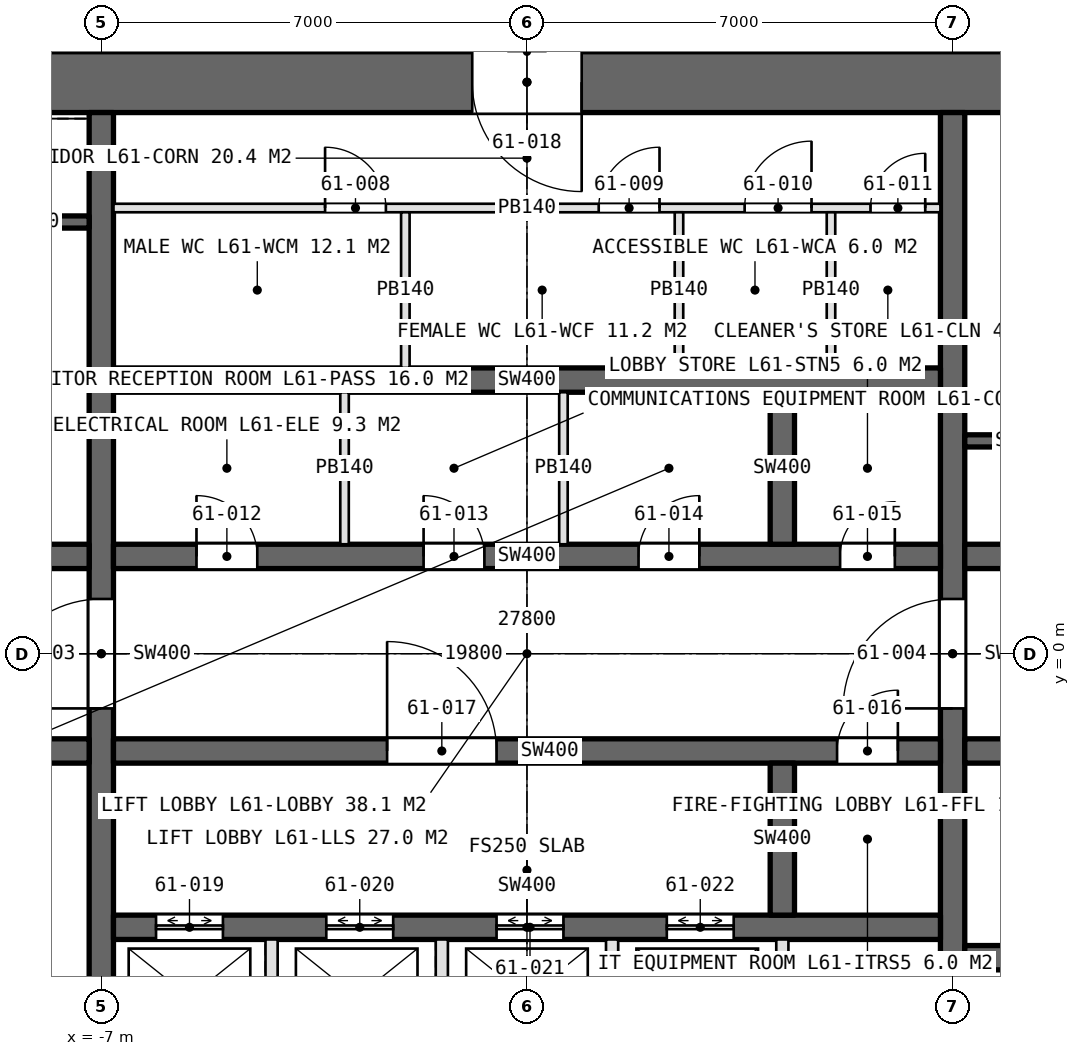
"""IFC4 building model, lengths in metres.
Left out: names, types, materials, properties, quantities, classifications, styles, units other than length and angle.
Written with IfcOpenShell. Run it as: python <this file> out.ifc"""

import sys

from ifc_helpers import new_model, si_unit, direction, frame, frame_2d, origin, place, context, subcontext, project, spatial, rectangle, extrude, element, fill, save


model = new_model("IFC4")
c1 = context("Model", 3, precision=1e-05, world=origin(), true_north=direction((0.0, 1.0)))
c2 = subcontext(c1, "Body", "Model", "MODEL_VIEW")
j1 = project(units=[si_unit("LENGTHUNIT", "METRE"), si_unit("PLANEANGLEUNIT", "RADIAN")], contexts=[c1])
p1 = place(None, origin())
s1 = spatial("IfcSite", under=j1, at=p1, CompositionType="ELEMENT")
p2 = place(p1, origin())
s2 = spatial("IfcBuilding", under=s1, at=p2, CompositionType="ELEMENT")
p3 = place(p2, frame((0.0, 0.0, 275.4)))
s3 = spatial("IfcBuildingStorey", under=s2, at=p3, CompositionType="ELEMENT", Elevation=275.4)
p4 = place(p3, frame((13.9, 9.4, 0.0), z_axis=(0.0, 0.0, 1.0), x_axis=(-1.0, 0.0, 0.0)))
e1 = element("IfcWall", 1, at=p4, inside=s3, PredefinedType="SHEAR", context=c2, shape_type="SweptSolid", body=[
    extrude(rectangle(XDim=27.8, YDim=1.0, at=frame_2d((13.9, 0.0))), origin(), (0.0, 0.0, 1.0), 4.2),
])
p5 = place(p4, frame((23.9, 0.0, 0.0)))
e2 = element("IfcOpeningElement", 2, at=p5, cuts=e1, PredefinedType="OPENING", context=c2, shape_type="SweptSolid", body=[
    extrude(rectangle(XDim=1.0, YDim=2.4, at=frame_2d((0.5, 1.2))), frame((0.0, 0.51, 0.0), z_axis=(0.0, -1.0, 0.0), x_axis=(1.0, 0.0, 0.0)), (0.0, 0.0, 1.0), 1.02),
])
p6 = place(p4, frame((13.0, 0.0, 0.0)))
e3 = element("IfcOpeningElement", 3, at=p6, cuts=e1, PredefinedType="OPENING", context=c2, shape_type="SweptSolid", body=[
    extrude(rectangle(XDim=1.8, YDim=2.4, at=frame_2d((0.9, 1.2))), frame((0.0, 0.51, 0.0), z_axis=(0.0, -1.0, 0.0), x_axis=(1.0, 0.0, 0.0)), (0.0, 0.0, 1.0), 1.02),
])
p7 = place(p3, frame((-7.0, -8.9, 0.0), z_axis=(0.0, 0.0, 1.0), x_axis=(0.0, 1.0, 0.0)))
e4 = element("IfcWall", 4, at=p7, inside=s3, PredefinedType="SHEAR", context=c2, shape_type="SweptSolid", body=[
    extrude(rectangle(XDim=17.8, YDim=0.4, at=frame_2d((8.9, 0.0))), origin(), (0.0, 0.0, 1.0), 4.2),
])
p8 = place(p7, frame((8.0, 0.0, 0.0)))
e5 = element("IfcOpeningElement", 5, at=p8, cuts=e4, PredefinedType="OPENING", context=c2, shape_type="SweptSolid", body=[
    extrude(rectangle(XDim=1.8, YDim=2.4, at=frame_2d((0.9, 1.2))), frame((0.0, 0.21, 0.0), z_axis=(0.0, -1.0, 0.0), x_axis=(1.0, 0.0, 0.0)), (0.0, 0.0, 1.0), 0.42),
])
p9 = place(p3, frame((7.0, -8.9, 0.0), z_axis=(0.0, 0.0, 1.0), x_axis=(0.0, 1.0, 0.0)))
e6 = element("IfcWall", 6, at=p9, inside=s3, PredefinedType="SHEAR", context=c2, shape_type="SweptSolid", body=[
    extrude(rectangle(XDim=17.8, YDim=0.4, at=frame_2d((8.9, 0.0))), origin(), (0.0, 0.0, 1.0), 4.2),
])
p10 = place(p9, frame((8.0, 0.0, 0.0)))
e7 = element("IfcOpeningElement", 7, at=p10, cuts=e6, PredefinedType="OPENING", context=c2, shape_type="SweptSolid", body=[
    extrude(rectangle(XDim=1.8, YDim=2.4, at=frame_2d((0.9, 1.2))), frame((0.0, 0.21, 0.0), z_axis=(0.0, -1.0, 0.0), x_axis=(1.0, 0.0, 0.0)), (0.0, 0.0, 1.0), 0.42),
])
p11 = place(p3, frame((-6.8, 1.6, 0.0), z_axis=(0.0, 0.0, 1.0), x_axis=(1.0, 0.0, 0.0)))
e8 = element("IfcWall", 8, at=p11, inside=s3, PredefinedType="SHEAR", context=c2, shape_type="SweptSolid", body=[
    extrude(rectangle(XDim=13.6, YDim=0.4, at=frame_2d((6.8, 0.0))), origin(), (0.0, 0.0, 1.0), 4.2),
])
p12 = place(p11, frame((1.365, 0.0, 0.0)))
e9 = element("IfcOpeningElement", 9, at=p12, cuts=e8, PredefinedType="OPENING", context=c2, shape_type="SweptSolid", body=[
    extrude(rectangle(XDim=1.0, YDim=2.4, at=frame_2d((0.5, 1.2))), frame((0.0, 0.21, 0.0), z_axis=(0.0, -1.0, 0.0), x_axis=(1.0, 0.0, 0.0)), (0.0, 0.0, 1.0), 0.42),
])
p13 = place(p11, frame((5.1, 0.0, 0.0)))
e10 = element("IfcOpeningElement", 10, at=p13, cuts=e8, PredefinedType="OPENING", context=c2, shape_type="SweptSolid", body=[
    extrude(rectangle(XDim=1.0, YDim=2.4, at=frame_2d((0.5, 1.2))), frame((0.0, 0.21, 0.0), z_axis=(0.0, -1.0, 0.0), x_axis=(1.0, 0.0, 0.0)), (0.0, 0.0, 1.0), 0.42),
])
p14 = place(p11, frame((8.635, 0.0, 0.0)))
e11 = element("IfcOpeningElement", 11, at=p14, cuts=e8, PredefinedType="OPENING", context=c2, shape_type="SweptSolid", body=[
    extrude(rectangle(XDim=1.0, YDim=2.4, at=frame_2d((0.5, 1.2))), frame((0.0, 0.21, 0.0), z_axis=(0.0, -1.0, 0.0), x_axis=(1.0, 0.0, 0.0)), (0.0, 0.0, 1.0), 0.42),
])
p15 = place(p11, frame((11.95, 0.0, 0.0)))
e12 = element("IfcOpeningElement", 12, at=p15, cuts=e8, PredefinedType="OPENING", context=c2, shape_type="SweptSolid", body=[
    extrude(rectangle(XDim=0.9, YDim=2.4, at=frame_2d((0.45, 1.2))), frame((0.0, 0.21, 0.0), z_axis=(0.0, -1.0, 0.0), x_axis=(1.0, 0.0, 0.0)), (0.0, 0.0, 1.0), 0.42),
])
p16 = place(p3, frame((-6.8, -1.6, 0.0), z_axis=(0.0, 0.0, 1.0), x_axis=(1.0, 0.0, 0.0)))
e13 = element("IfcWall", 13, at=p16, inside=s3, PredefinedType="SHEAR", context=c2, shape_type="SweptSolid", body=[
    extrude(rectangle(XDim=13.6, YDim=0.4, at=frame_2d((6.8, 0.0))), origin(), (0.0, 0.0, 1.0), 4.2),
])
p17 = place(p16, frame((11.9, 0.0, 0.0)))
e14 = element("IfcOpeningElement", 14, at=p17, cuts=e13, PredefinedType="OPENING", context=c2, shape_type="SweptSolid", body=[
    extrude(rectangle(XDim=1.0, YDim=2.4, at=frame_2d((0.5, 1.2))), frame((0.0, 0.21, 0.0), z_axis=(0.0, -1.0, 0.0), x_axis=(1.0, 0.0, 0.0)), (0.0, 0.0, 1.0), 0.42),
])
p18 = place(p16, frame((4.5, 0.0, 0.0)))
e15 = element("IfcOpeningElement", 15, at=p18, cuts=e13, PredefinedType="OPENING", context=c2, shape_type="SweptSolid", body=[
    extrude(rectangle(XDim=1.8, YDim=2.4, at=frame_2d((0.9, 1.2))), frame((0.0, 0.21, 0.0), z_axis=(0.0, -1.0, 0.0), x_axis=(1.0, 0.0, 0.0)), (0.0, 0.0, 1.0), 0.42),
])
p19 = place(p3, frame((-6.8, 4.5, 0.0), z_axis=(0.0, 0.0, 1.0), x_axis=(1.0, 0.0, 0.0)))
e16 = element("IfcWall", 16, at=p19, inside=s3, PredefinedType="SHEAR", context=c2, shape_type="SweptSolid", body=[
    extrude(rectangle(XDim=13.6, YDim=0.4, at=frame_2d((6.8, 0.0))), origin(), (0.0, 0.0, 1.0), 4.2),
])
p20 = place(p3, frame((-6.8, -4.5, 0.0), z_axis=(0.0, 0.0, 1.0), x_axis=(1.0, 0.0, 0.0)))
e17 = element("IfcWall", 17, at=p20, inside=s3, PredefinedType="SHEAR", context=c2, shape_type="SweptSolid", body=[
    extrude(rectangle(XDim=13.6, YDim=0.4, at=frame_2d((6.8, 0.0))), origin(), (0.0, 0.0, 1.0), 4.2),
])
p21 = place(p20, frame((0.7, 0.0, 0.0)))
e18 = element("IfcOpeningElement", 18, at=p21, cuts=e17, PredefinedType="OPENING", context=c2, shape_type="SweptSolid", body=[
    extrude(rectangle(XDim=1.1, YDim=2.4, at=frame_2d((0.55, 1.2))), frame((0.0, 0.21, 0.0), z_axis=(0.0, -1.0, 0.0), x_axis=(1.0, 0.0, 0.0)), (0.0, 0.0, 1.0), 0.42),
])
p22 = place(p20, frame((3.5, 0.0, 0.0)))
e19 = element("IfcOpeningElement", 19, at=p22, cuts=e17, PredefinedType="OPENING", context=c2, shape_type="SweptSolid", body=[
    extrude(rectangle(XDim=1.1, YDim=2.4, at=frame_2d((0.55, 1.2))), frame((0.0, 0.21, 0.0), z_axis=(0.0, -1.0, 0.0), x_axis=(1.0, 0.0, 0.0)), (0.0, 0.0, 1.0), 0.42),
])
p23 = place(p20, frame((6.3, 0.0, 0.0)))
e20 = element("IfcOpeningElement", 20, at=p23, cuts=e17, PredefinedType="OPENING", context=c2, shape_type="SweptSolid", body=[
    extrude(rectangle(XDim=1.1, YDim=2.4, at=frame_2d((0.55, 1.2))), frame((0.0, 0.21, 0.0), z_axis=(0.0, -1.0, 0.0), x_axis=(1.0, 0.0, 0.0)), (0.0, 0.0, 1.0), 0.42),
])
p24 = place(p20, frame((9.1, 0.0, 0.0)))
e21 = element("IfcOpeningElement", 21, at=p24, cuts=e17, PredefinedType="OPENING", context=c2, shape_type="SweptSolid", body=[
    extrude(rectangle(XDim=1.1, YDim=2.4, at=frame_2d((0.55, 1.2))), frame((0.0, 0.21, 0.0), z_axis=(0.0, -1.0, 0.0), x_axis=(1.0, 0.0, 0.0)), (0.0, 0.0, 1.0), 0.42),
])
for number, where, z_axis, x_axis in (
    (22, (-12.9, 1.6, 0.0), (0.0, 0.0, 1.0), (1.0, 0.0, 0.0)),
    (23, (-12.9, -1.6, 0.0), (0.0, 0.0, 1.0), (1.0, 0.0, 0.0)),
):
    element("IfcWall", number, at=place(p3, frame(where, z_axis=z_axis, x_axis=x_axis)), inside=s3, PredefinedType="SHEAR", context=c2, shape_type="SweptSolid", body=[
        extrude(rectangle(XDim=5.7, YDim=0.4, at=frame_2d((2.85, 0.0))), origin(), (0.0, 0.0, 1.0), 4.2),
    ])
p25 = place(p3, frame((7.2, 1.6, 0.0), z_axis=(0.0, 0.0, 1.0), x_axis=(1.0, 0.0, 0.0)))
e24 = element("IfcWall", 24, at=p25, inside=s3, PredefinedType="SHEAR", context=c2, shape_type="SweptSolid", body=[
    extrude(rectangle(XDim=5.7, YDim=0.4, at=frame_2d((2.85, 0.0))), origin(), (0.0, 0.0, 1.0), 4.2),
])
p26 = place(p25, frame((0.7, 0.0, 0.0)))
e25 = element("IfcOpeningElement", 25, at=p26, cuts=e24, PredefinedType="OPENING", context=c2, shape_type="SweptSolid", body=[
    extrude(rectangle(XDim=1.0, YDim=2.4, at=frame_2d((0.5, 1.2))), frame((0.0, 0.21, 0.0), z_axis=(0.0, -1.0, 0.0), x_axis=(1.0, 0.0, 0.0)), (0.0, 0.0, 1.0), 0.42),
])
p27 = place(p3, frame((7.2, -1.6, 0.0), z_axis=(0.0, 0.0, 1.0), x_axis=(1.0, 0.0, 0.0)))
e26 = element("IfcWall", 26, at=p27, inside=s3, PredefinedType="SHEAR", context=c2, shape_type="SweptSolid", body=[
    extrude(rectangle(XDim=5.7, YDim=0.4, at=frame_2d((2.85, 0.0))), origin(), (0.0, 0.0, 1.0), 4.2),
])
p28 = place(p27, frame((0.9, 0.0, 0.0)))
e27 = element("IfcOpeningElement", 27, at=p28, cuts=e26, PredefinedType="OPENING", context=c2, shape_type="SweptSolid", body=[
    extrude(rectangle(XDim=1.3, YDim=2.4, at=frame_2d((0.65, 1.2))), frame((0.0, 0.21, 0.0), z_axis=(0.0, -1.0, 0.0), x_axis=(1.0, 0.0, 0.0)), (0.0, 0.0, 1.0), 0.42),
])
p29 = place(p27, frame((3.95, 0.0, 0.0)))
e28 = element("IfcOpeningElement", 28, at=p29, cuts=e26, PredefinedType="OPENING", context=c2, shape_type="SweptSolid", body=[
    extrude(rectangle(XDim=1.3, YDim=2.4, at=frame_2d((0.65, 1.2))), frame((0.0, 0.21, 0.0), z_axis=(0.0, -1.0, 0.0), x_axis=(1.0, 0.0, 0.0)), (0.0, 0.0, 1.0), 0.42),
])
p30 = place(p3, frame((7.2, -5.0, 0.0), z_axis=(0.0, 0.0, 1.0), x_axis=(1.0, 0.0, 0.0)))
e29 = element("IfcWall", 29, at=p30, inside=s3, PredefinedType="SHEAR", context=c2, shape_type="SweptSolid", body=[
    extrude(rectangle(XDim=5.7, YDim=0.4, at=frame_2d((2.85, 0.0))), origin(), (0.0, 0.0, 1.0), 4.2),
])
for number, where, z_axis, x_axis in (
    (30, (4.2, 1.8, 0.0), (0.0, 0.0, 1.0), (0.0, 1.0, 0.0)),
    (31, (4.2, -4.3, 0.0), (0.0, 0.0, 1.0), (0.0, 1.0, 0.0)),
):
    element("IfcWall", number, at=place(p3, frame(where, z_axis=z_axis, x_axis=x_axis)), inside=s3, PredefinedType="SHEAR", context=c2, shape_type="SweptSolid", body=[
        extrude(rectangle(XDim=2.5, YDim=0.4, at=frame_2d((1.25, 0.0))), origin(), (0.0, 0.0, 1.0), 4.2),
    ])
p31 = place(p3, frame((-6.8, 7.33, 0.0), z_axis=(0.0, 0.0, 1.0), x_axis=(1.0, 0.0, 0.0)))
e32 = element("IfcWall", 32, at=p31, inside=s3, PredefinedType="PARTITIONING", context=c2, shape_type="SweptSolid", body=[
    extrude(rectangle(XDim=13.6, YDim=0.14, at=frame_2d((6.8, 0.0))), origin(), (0.0, 0.0, 1.0), 3.95),
])
p32 = place(p31, frame((3.48, 0.0, 0.0)))
e33 = element("IfcOpeningElement", 33, at=p32, cuts=e32, PredefinedType="OPENING", context=c2, shape_type="SweptSolid", body=[
    extrude(rectangle(XDim=1.0, YDim=2.4, at=frame_2d((0.5, 1.2))), frame((0.0, 0.08, 0.0), z_axis=(0.0, -1.0, 0.0), x_axis=(1.0, 0.0, 0.0)), (0.0, 0.0, 1.0), 0.16),
])
p33 = place(p31, frame((7.98, 0.0, 0.0)))
e34 = element("IfcOpeningElement", 34, at=p33, cuts=e32, PredefinedType="OPENING", context=c2, shape_type="SweptSolid", body=[
    extrude(rectangle(XDim=1.0, YDim=2.4, at=frame_2d((0.5, 1.2))), frame((0.0, 0.08, 0.0), z_axis=(0.0, -1.0, 0.0), x_axis=(1.0, 0.0, 0.0)), (0.0, 0.0, 1.0), 0.16),
])
p34 = place(p31, frame((10.38, 0.0, 0.0)))
e35 = element("IfcOpeningElement", 35, at=p34, cuts=e32, PredefinedType="OPENING", context=c2, shape_type="SweptSolid", body=[
    extrude(rectangle(XDim=1.1, YDim=2.4, at=frame_2d((0.55, 1.2))), frame((0.0, 0.08, 0.0), z_axis=(0.0, -1.0, 0.0), x_axis=(1.0, 0.0, 0.0)), (0.0, 0.0, 1.0), 0.16),
])
p35 = place(p31, frame((12.45, 0.0, 0.0)))
e36 = element("IfcOpeningElement", 36, at=p35, cuts=e32, PredefinedType="OPENING", context=c2, shape_type="SweptSolid", body=[
    extrude(rectangle(XDim=0.9, YDim=2.4, at=frame_2d((0.45, 1.2))), frame((0.0, 0.08, 0.0), z_axis=(0.0, -1.0, 0.0), x_axis=(1.0, 0.0, 0.0)), (0.0, 0.0, 1.0), 0.16),
])
for number, where, z_axis, x_axis in (
    (37, (-2.0, 4.7, 0.0), (0.0, 0.0, 1.0), (0.0, 1.0, 0.0)),
    (38, (2.5, 4.7, 0.0), (0.0, 0.0, 1.0), (0.0, 1.0, 0.0)),
    (39, (5.0, 4.7, 0.0), (0.0, 0.0, 1.0), (0.0, 1.0, 0.0)),
):
    element("IfcWall", number, at=place(p3, frame(where, z_axis=z_axis, x_axis=x_axis)), inside=s3, PredefinedType="PARTITIONING", context=c2, shape_type="SweptSolid", body=[
        extrude(rectangle(XDim=2.56, YDim=0.14, at=frame_2d((1.28, 0.0))), origin(), (0.0, 0.0, 1.0), 3.95),
    ])
for number, where, z_axis, x_axis in (
    (40, (-3.0, 1.8, 0.0), (0.0, 0.0, 1.0), (0.0, 1.0, 0.0)),
    (41, (0.6, 1.8, 0.0), (0.0, 0.0, 1.0), (0.0, 1.0, 0.0)),
):
    element("IfcWall", number, at=place(p3, frame(where, z_axis=z_axis, x_axis=x_axis)), inside=s3, PredefinedType="PARTITIONING", context=c2, shape_type="SweptSolid", body=[
        extrude(rectangle(XDim=2.5, YDim=0.14, at=frame_2d((1.25, 0.0))), origin(), (0.0, 0.0, 1.0), 3.95),
    ])
for number, where, z_axis, x_axis in (
    (42, (-4.2, -4.7, 0.0), (0.0, 0.0, 1.0), (0.0, -1.0, 0.0)),
    (43, (-1.4, -4.7, 0.0), (0.0, 0.0, 1.0), (0.0, -1.0, 0.0)),
    (44, (1.4, -4.7, 0.0), (0.0, 0.0, 1.0), (0.0, -1.0, 0.0)),
    (45, (4.2, -4.7, 0.0), (0.0, 0.0, 1.0), (0.0, -1.0, 0.0)),
):
    element("IfcWall", number, at=place(p3, frame(where, z_axis=z_axis, x_axis=x_axis)), inside=s3, PredefinedType="PARTITIONING", context=c2, shape_type="SweptSolid", body=[
        extrude(rectangle(XDim=4.2, YDim=0.2, at=frame_2d((2.1, 0.0))), origin(), (0.0, 0.0, 1.0), 4.2),
    ])
for number, where, z_axis, x_axis in (
    (46, (-9.15, 7.1, 0.0), (0.0, 0.0, 1.0), (1.0, 0.0, 0.0)),
    (47, (9.15, 3.5, 0.0), (0.0, 0.0, 1.0), (-1.0, 0.0, 0.0)),
):
    element("IfcWall", number, at=place(p3, frame(where, z_axis=z_axis, x_axis=x_axis)), inside=s3, PredefinedType="SOLIDWALL", context=c2, shape_type="SweptSolid", body=[
        extrude(rectangle(XDim=1.95, YDim=0.2, at=frame_2d((0.975, 0.0))), origin(), (0.0, 0.0, 1.0), 4.2),
    ])
p36 = place(p8, origin())
e48 = element("IfcDoor", 48, at=p36, inside=s3, OperationType="DOUBLE_DOOR_SINGLE_SWING", PredefinedType="DOOR", context=c2, shape_type="SweptSolid", body=[
    extrude(rectangle(XDim=1.8, YDim=2.4, at=frame_2d((0.9, 1.2))), frame((0.0, 0.025, 0.0), z_axis=(0.0, -1.0, 0.0), x_axis=(1.0, 0.0, 0.0)), (0.0, 0.0, 1.0), 0.05),
])
fill(e5, e48)
p37 = place(p10, origin())
e49 = element("IfcDoor", 49, at=p37, inside=s3, OperationType="DOUBLE_DOOR_SINGLE_SWING", PredefinedType="DOOR", context=c2, shape_type="SweptSolid", body=[
    extrude(rectangle(XDim=1.8, YDim=2.4, at=frame_2d((0.9, 1.2))), frame((0.0, 0.025, 0.0), z_axis=(0.0, -1.0, 0.0), x_axis=(1.0, 0.0, 0.0)), (0.0, 0.0, 1.0), 0.05),
])
fill(e7, e49)
p38 = place(p32, origin())
e50 = element("IfcDoor", 50, at=p38, inside=s3, OperationType="SINGLE_SWING_LEFT", PredefinedType="DOOR", context=c2, shape_type="SweptSolid", body=[
    extrude(rectangle(XDim=1.0, YDim=2.4, at=frame_2d((0.5, 1.2))), frame((0.0, 0.025, 0.0), z_axis=(0.0, -1.0, 0.0), x_axis=(1.0, 0.0, 0.0)), (0.0, 0.0, 1.0), 0.05),
])
fill(e33, e50)
p39 = place(p33, origin())
e51 = element("IfcDoor", 51, at=p39, inside=s3, OperationType="SINGLE_SWING_RIGHT", PredefinedType="DOOR", context=c2, shape_type="SweptSolid", body=[
    extrude(rectangle(XDim=1.0, YDim=2.4, at=frame_2d((0.5, 1.2))), frame((0.0, 0.025, 0.0), z_axis=(0.0, -1.0, 0.0), x_axis=(1.0, 0.0, 0.0)), (0.0, 0.0, 1.0), 0.05),
])
fill(e34, e51)
p40 = place(p34, origin())
e52 = element("IfcDoor", 52, at=p40, inside=s3, OperationType="SINGLE_SWING_RIGHT", PredefinedType="DOOR", context=c2, shape_type="SweptSolid", body=[
    extrude(rectangle(XDim=1.1, YDim=2.4, at=frame_2d((0.55, 1.2))), frame((0.0, 0.025, 0.0), z_axis=(0.0, -1.0, 0.0), x_axis=(1.0, 0.0, 0.0)), (0.0, 0.0, 1.0), 0.05),
])
fill(e35, e52)
p41 = place(p35, origin())
e53 = element("IfcDoor", 53, at=p41, inside=s3, OperationType="SINGLE_SWING_RIGHT", PredefinedType="DOOR", context=c2, shape_type="SweptSolid", body=[
    extrude(rectangle(XDim=0.9, YDim=2.4, at=frame_2d((0.45, 1.2))), frame((0.0, 0.025, 0.0), z_axis=(0.0, -1.0, 0.0), x_axis=(1.0, 0.0, 0.0)), (0.0, 0.0, 1.0), 0.05),
])
fill(e36, e53)
p42 = place(p12, origin())
e54 = element("IfcDoor", 54, at=p42, inside=s3, OperationType="SINGLE_SWING_LEFT", PredefinedType="DOOR", context=c2, shape_type="SweptSolid", body=[
    extrude(rectangle(XDim=1.0, YDim=2.4, at=frame_2d((0.5, 1.2))), frame((0.0, 0.025, 0.0), z_axis=(0.0, -1.0, 0.0), x_axis=(1.0, 0.0, 0.0)), (0.0, 0.0, 1.0), 0.05),
])
fill(e9, e54)
p43 = place(p13, origin())
e55 = element("IfcDoor", 55, at=p43, inside=s3, OperationType="SINGLE_SWING_LEFT", PredefinedType="DOOR", context=c2, shape_type="SweptSolid", body=[
    extrude(rectangle(XDim=1.0, YDim=2.4, at=frame_2d((0.5, 1.2))), frame((0.0, 0.025, 0.0), z_axis=(0.0, -1.0, 0.0), x_axis=(1.0, 0.0, 0.0)), (0.0, 0.0, 1.0), 0.05),
])
fill(e10, e55)
p44 = place(p14, origin())
e56 = element("IfcDoor", 56, at=p44, inside=s3, OperationType="SINGLE_SWING_RIGHT", PredefinedType="DOOR", context=c2, shape_type="SweptSolid", body=[
    extrude(rectangle(XDim=1.0, YDim=2.4, at=frame_2d((0.5, 1.2))), frame((0.0, 0.025, 0.0), z_axis=(0.0, -1.0, 0.0), x_axis=(1.0, 0.0, 0.0)), (0.0, 0.0, 1.0), 0.05),
])
fill(e11, e56)
p45 = place(p15, origin())
e57 = element("IfcDoor", 57, at=p45, inside=s3, OperationType="SINGLE_SWING_RIGHT", PredefinedType="DOOR", context=c2, shape_type="SweptSolid", body=[
    extrude(rectangle(XDim=0.9, YDim=2.4, at=frame_2d((0.45, 1.2))), frame((0.0, 0.025, 0.0), z_axis=(0.0, -1.0, 0.0), x_axis=(1.0, 0.0, 0.0)), (0.0, 0.0, 1.0), 0.05),
])
fill(e12, e57)
p46 = place(p17, origin())
e58 = element("IfcDoor", 58, at=p46, inside=s3, OperationType="SINGLE_SWING_RIGHT", PredefinedType="DOOR", context=c2, shape_type="SweptSolid", body=[
    extrude(rectangle(XDim=1.0, YDim=2.4, at=frame_2d((0.5, 1.2))), frame((0.0, 0.025, 0.0), z_axis=(0.0, -1.0, 0.0), x_axis=(1.0, 0.0, 0.0)), (0.0, 0.0, 1.0), 0.05),
])
fill(e14, e58)
p47 = place(p18, origin())
e59 = element("IfcDoor", 59, at=p47, inside=s3, OperationType="DOUBLE_DOOR_SINGLE_SWING", PredefinedType="DOOR", context=c2, shape_type="SweptSolid", body=[
    extrude(rectangle(XDim=1.8, YDim=2.4, at=frame_2d((0.9, 1.2))), frame((0.0, 0.025, 0.0), z_axis=(0.0, -1.0, 0.0), x_axis=(1.0, 0.0, 0.0)), (0.0, 0.0, 1.0), 0.05),
])
fill(e15, e59)
p48 = place(p6, origin())
e60 = element("IfcDoor", 60, at=p48, inside=s3, OperationType="DOUBLE_DOOR_SINGLE_SWING", PredefinedType="DOOR", context=c2, shape_type="SweptSolid", body=[
    extrude(rectangle(XDim=1.8, YDim=2.4, at=frame_2d((0.9, 1.2))), frame((0.0, 0.025, 0.0), z_axis=(0.0, -1.0, 0.0), x_axis=(1.0, 0.0, 0.0)), (0.0, 0.0, 1.0), 0.05),
])
fill(e3, e60)
p49 = place(p21, origin())
e61 = element("IfcDoor", 61, at=p49, inside=s3, OperationType="DOUBLE_DOOR_SLIDING", PredefinedType="DOOR", context=c2, shape_type="SweptSolid", body=[
    extrude(rectangle(XDim=1.1, YDim=2.4, at=frame_2d((0.55, 1.2))), frame((0.0, 0.025, 0.0), z_axis=(0.0, -1.0, 0.0), x_axis=(1.0, 0.0, 0.0)), (0.0, 0.0, 1.0), 0.05),
])
fill(e18, e61)
p50 = place(p22, origin())
e62 = element("IfcDoor", 62, at=p50, inside=s3, OperationType="DOUBLE_DOOR_SLIDING", PredefinedType="DOOR", context=c2, shape_type="SweptSolid", body=[
    extrude(rectangle(XDim=1.1, YDim=2.4, at=frame_2d((0.55, 1.2))), frame((0.0, 0.025, 0.0), z_axis=(0.0, -1.0, 0.0), x_axis=(1.0, 0.0, 0.0)), (0.0, 0.0, 1.0), 0.05),
])
fill(e19, e62)
p51 = place(p23, origin())
e63 = element("IfcDoor", 63, at=p51, inside=s3, OperationType="DOUBLE_DOOR_SLIDING", PredefinedType="DOOR", context=c2, shape_type="SweptSolid", body=[
    extrude(rectangle(XDim=1.1, YDim=2.4, at=frame_2d((0.55, 1.2))), frame((0.0, 0.025, 0.0), z_axis=(0.0, -1.0, 0.0), x_axis=(1.0, 0.0, 0.0)), (0.0, 0.0, 1.0), 0.05),
])
fill(e20, e63)
p52 = place(p24, origin())
e64 = element("IfcDoor", 64, at=p52, inside=s3, OperationType="DOUBLE_DOOR_SLIDING", PredefinedType="DOOR", context=c2, shape_type="SweptSolid", body=[
    extrude(rectangle(XDim=1.1, YDim=2.4, at=frame_2d((0.55, 1.2))), frame((0.0, 0.025, 0.0), z_axis=(0.0, -1.0, 0.0), x_axis=(1.0, 0.0, 0.0)), (0.0, 0.0, 1.0), 0.05),
])
fill(e21, e64)
save(model, sys.argv[1])
